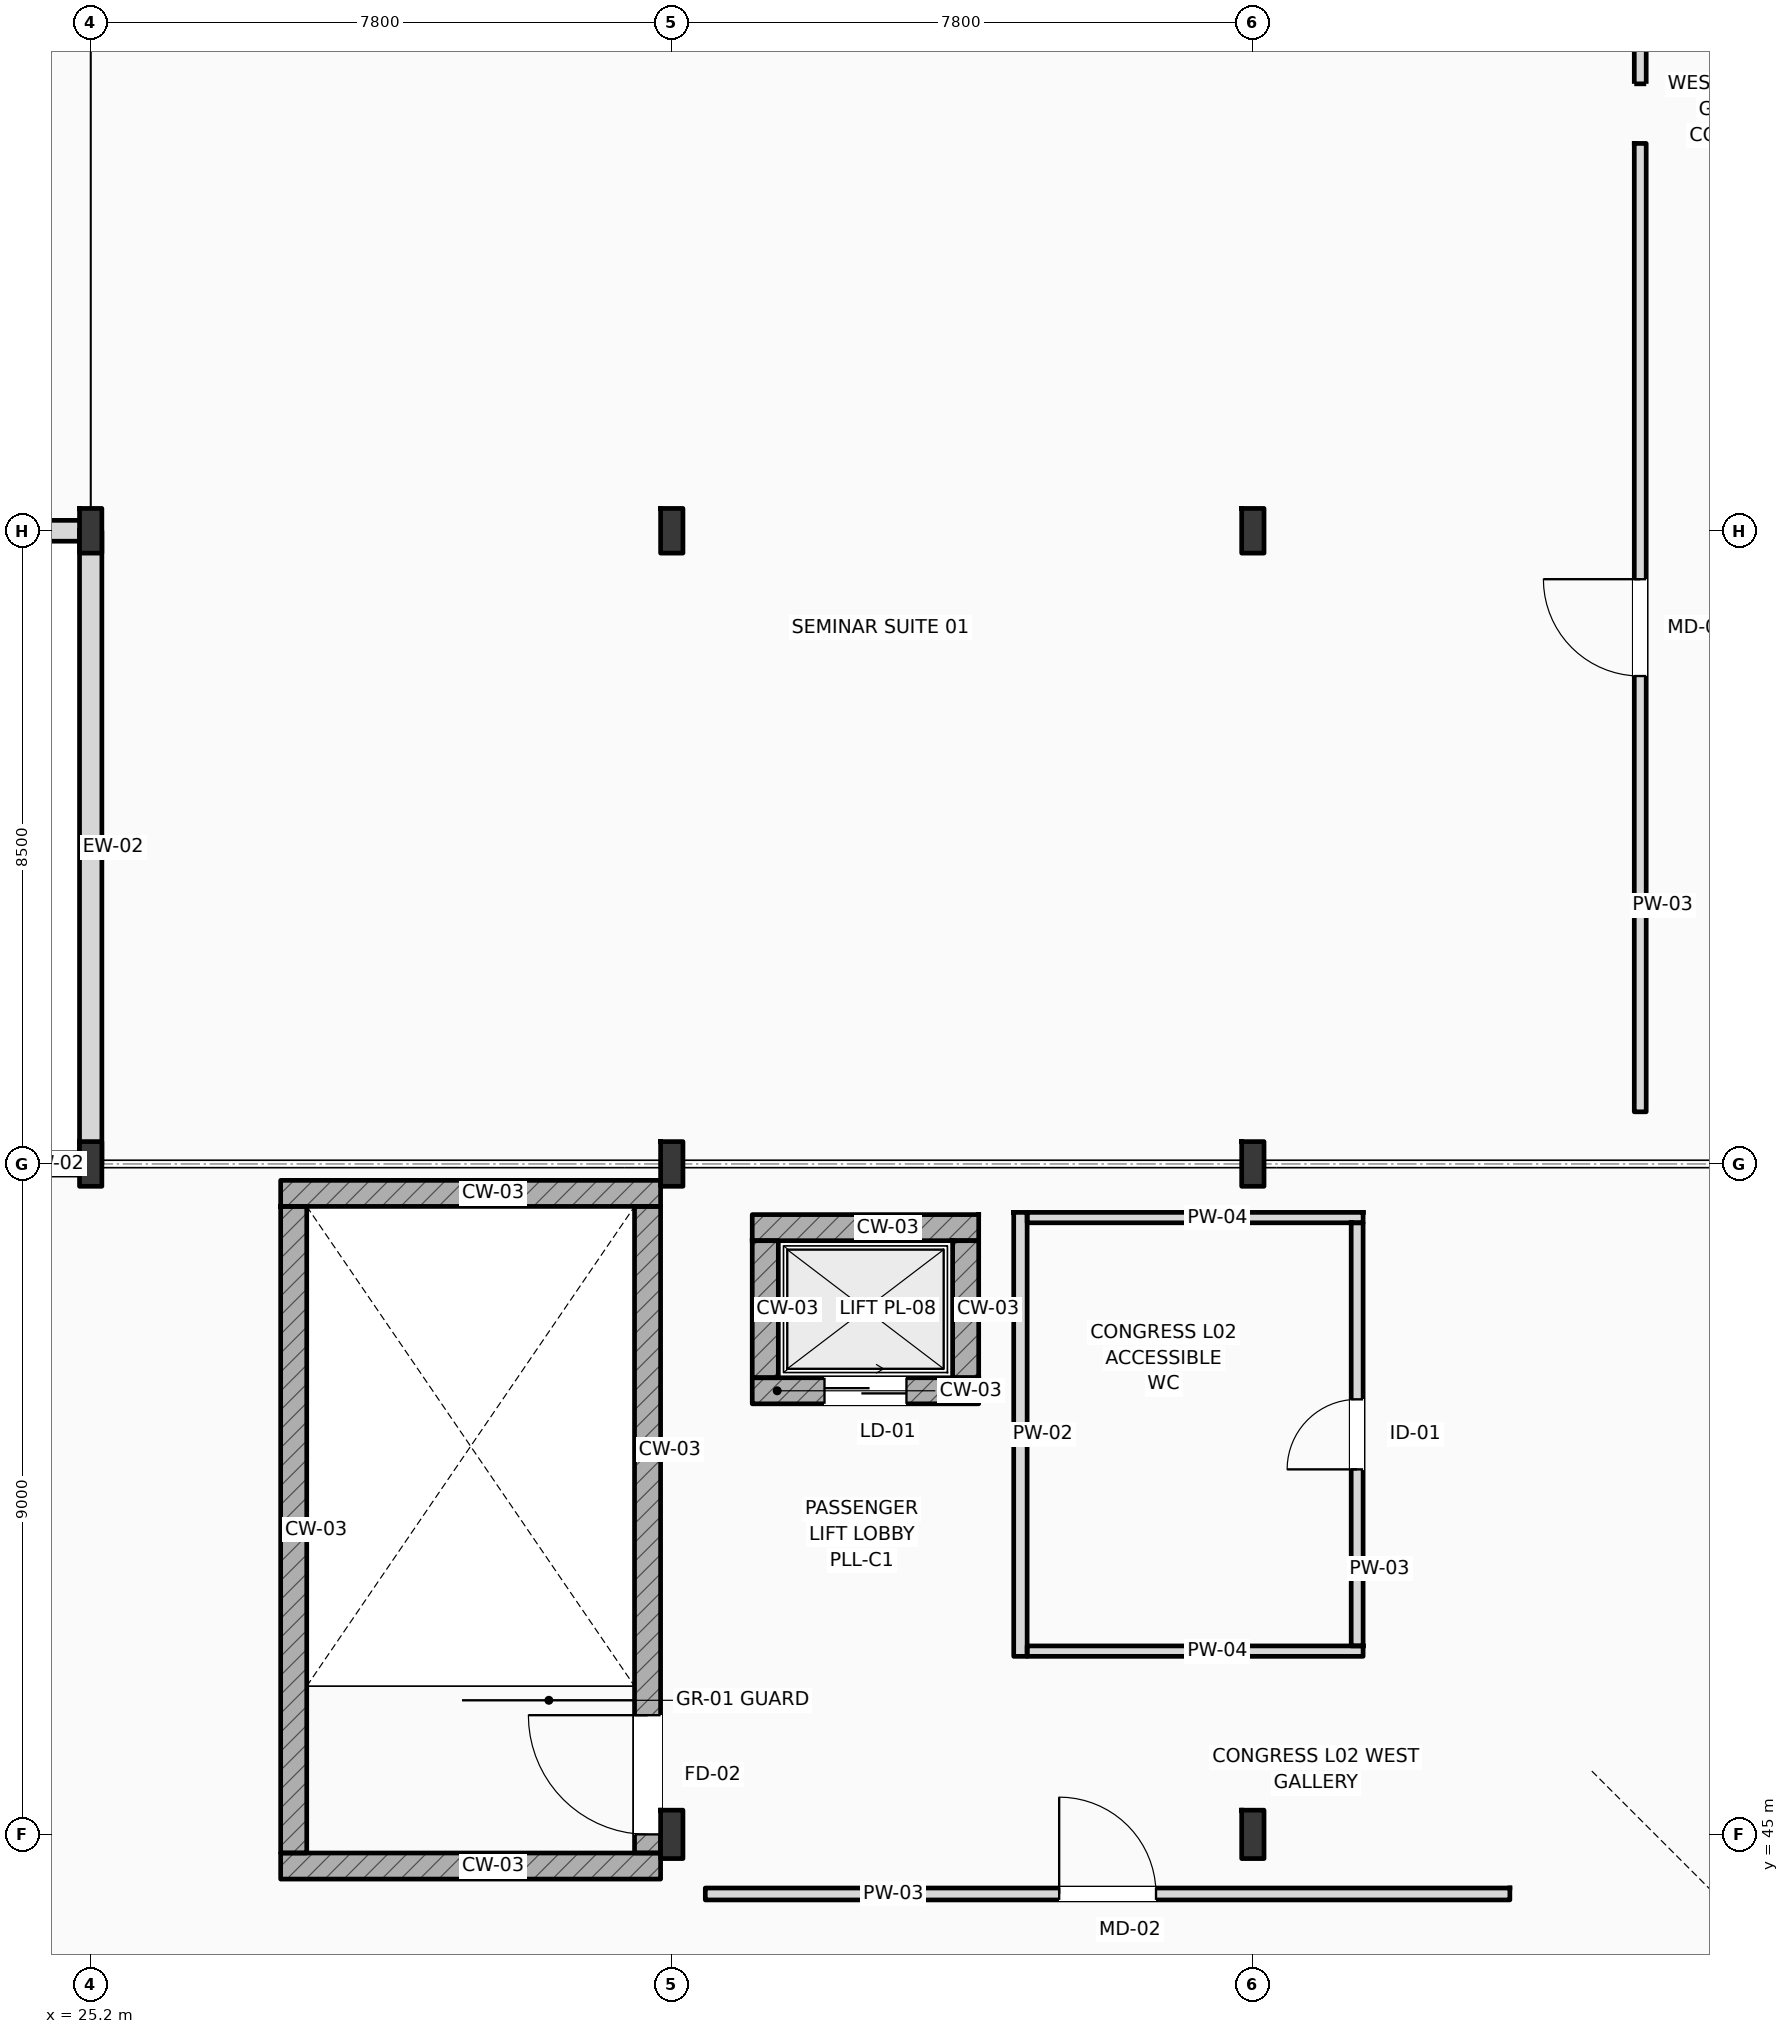
"""IFC4 building model, lengths in metres.
Left out: names, types, materials, properties, quantities, classifications, styles, units other than length and angle.
Written with IfcOpenShell. Run it as: python <this file> out.ifc"""

import sys

from ifc_helpers import new_model, si_unit, direction, frame, frame_2d, origin, origin_2d, place, context, subcontext, project, spatial, rectangle, i_section, extrude, element, fill, save


model = new_model("IFC4")
c1 = context("Model", 3, precision=1e-05, world=origin(), true_north=direction((0.0, 1.0)))
c2 = subcontext(c1, "Body", "Model", "MODEL_VIEW")
j1 = project(units=[si_unit("LENGTHUNIT", "METRE"), si_unit("PLANEANGLEUNIT", "RADIAN")], contexts=[c1])
p1 = place(None, origin())
s1 = spatial("IfcSite", under=j1, at=p1, CompositionType="ELEMENT")
p2 = place(p1, origin())
s2 = spatial("IfcBuilding", under=s1, at=p2, CompositionType="ELEMENT")
p3 = place(p2, frame((0.0, 0.0, 11.4)))
s3 = spatial("IfcBuildingStorey", under=s2, at=p3, CompositionType="ELEMENT", Elevation=11.4)
for number, where, z_axis, x_axis in (
    (1, (25.2, 62.5, 0.0), (0.0, 0.0, 1.0), (1.0, 0.0, 0.0)),
    (2, (25.2, 54.0, 0.0), (0.0, 0.0, 1.0), (1.0, 0.0, 0.0)),
    (3, (33.0, 54.0, 0.0), (0.0, 0.0, 1.0), (1.0, 0.0, 0.0)),
    (4, (33.0, 62.5, 0.0), (0.0, 0.0, 1.0), (1.0, 0.0, 0.0)),
    (5, (40.8, 54.0, 0.0), (0.0, 0.0, 1.0), (1.0, 0.0, 0.0)),
    (6, (40.8, 62.5, 0.0), (0.0, 0.0, 1.0), (1.0, 0.0, 0.0)),
):
    element("IfcColumn", number, at=place(p3, frame(where, z_axis=z_axis, x_axis=x_axis)), inside=s3, PredefinedType="COLUMN", context=c2, shape_type="SweptSolid", body=[
        extrude(i_section(OverallWidth=0.3, OverallDepth=0.6, WebThickness=0.015, FlangeThickness=0.03, FilletRadius=0.027, at=origin_2d()), origin(), (0.0, 0.0, 1.0), 4.8),
    ])
for number, where, z_axis, x_axis in (
    (7, (33.0, 45.0, 0.0), (0.0, 0.0, 1.0), (1.0, 0.0, 0.0)),
    (8, (40.8, 45.0, 0.0), (0.0, 0.0, 1.0), (1.0, 0.0, 0.0)),
):
    element("IfcColumn", number, at=place(p3, frame(where, z_axis=z_axis, x_axis=x_axis)), inside=s3, PredefinedType="COLUMN", context=c2, shape_type="SweptSolid", body=[
        extrude(i_section(OverallWidth=0.3, OverallDepth=0.65, WebThickness=0.016, FlangeThickness=0.031, FilletRadius=0.027, at=origin_2d()), origin(), (0.0, 0.0, 1.0), 4.8),
    ])
for number, where, z_axis, x_axis in (
    (9, (27.75, 53.605, 0.0), (0.0, 0.0, 1.0), (1.0, 0.0, 0.0)),
    (10, (27.75, 44.575, 0.0), (0.0, 0.0, 1.0), (1.0, 0.0, 0.0)),
):
    element("IfcWall", number, at=place(p3, frame(where, z_axis=z_axis, x_axis=x_axis)), inside=s3, PredefinedType="SHEAR", context=c2, shape_type="SweptSolid", body=[
        extrude(rectangle(XDim=5.1, YDim=0.35, at=frame_2d((2.55, 0.0))), origin(), (0.0, 0.0, 1.0), 4.8),
    ])
p4 = place(p3, frame((27.925, 44.75, 0.0), z_axis=(0.0, 0.0, 1.0), x_axis=(0.0, 1.0, 0.0)))
e11 = element("IfcWall", 11, at=p4, inside=s3, PredefinedType="SHEAR", context=c2, shape_type="SweptSolid", body=[
    extrude(rectangle(XDim=8.68, YDim=0.35, at=frame_2d((4.34, 0.0))), origin(), (0.0, 0.0, 1.0), 4.8),
])
p5 = place(p3, frame((32.675, 44.75, 0.0), z_axis=(0.0, 0.0, 1.0), x_axis=(0.0, 1.0, 0.0)))
e12 = element("IfcWall", 12, at=p5, inside=s3, PredefinedType="SHEAR", context=c2, shape_type="SweptSolid", body=[
    extrude(rectangle(XDim=8.68, YDim=0.35, at=frame_2d((4.34, 0.0))), origin(), (0.0, 0.0, 1.0), 4.8),
])
p6 = place(p5, frame((0.25, 0.0, 0.0)))
e13 = element("IfcOpeningElement", 13, at=p6, cuts=e12, PredefinedType="OPENING", context=c2, shape_type="SweptSolid", body=[
    extrude(rectangle(XDim=1.6, YDim=2.2, at=frame_2d((0.8, 1.1))), frame((0.0, 0.185, 0.0), z_axis=(0.0, -1.0, 0.0), x_axis=(1.0, 0.0, 0.0)), (0.0, 0.0, 1.0), 0.37),
])
p7 = place(p3, frame((25.2, 54.0, 0.0), z_axis=(0.0, 0.0, 1.0), x_axis=(0.0, 1.0, 0.0)))
e14 = element("IfcWall", 14, at=p7, inside=s3, PredefinedType="STANDARD", context=c2, shape_type="SweptSolid", body=[
    extrude(rectangle(XDim=8.5, YDim=0.3, at=frame_2d((4.25, 0.0))), origin(), (0.0, 0.0, 1.0), 4.11),
])
p8 = place(p3, frame((23.6, 54.0, 0.0), z_axis=(0.0, 0.0, 1.0), x_axis=(1.0, 0.0, 0.0)))
e15 = element("IfcWall", 15, at=p8, inside=s3, PredefinedType="STANDARD", context=c2, shape_type="SweptSolid", body=[
    extrude(rectangle(XDim=1.6, YDim=0.3, at=frame_2d((0.8, 0.0))), origin(), (0.0, 0.0, 1.0), 4.54),
])
p9 = place(p3, frame((0.0, 62.5, 0.0), z_axis=(0.0, 0.0, 1.0), x_axis=(1.0, 0.0, 0.0)))
e16 = element("IfcWall", 16, at=p9, inside=s3, PredefinedType="STANDARD", context=c2, shape_type="SweptSolid", body=[
    extrude(rectangle(XDim=25.2, YDim=0.28, at=frame_2d((12.6, 0.0))), origin(), (0.0, 0.0, 1.0), 3.96),
])
p10 = place(p3, frame((34.08, 53.145, 0.0), z_axis=(0.0, 0.0, 1.0), x_axis=(1.0, 0.0, 0.0)))
e17 = element("IfcWall", 17, at=p10, inside=s3, PredefinedType="SHEAR", context=c2, shape_type="SweptSolid", body=[
    extrude(rectangle(XDim=3.04, YDim=0.35, at=frame_2d((1.52, 0.0))), origin(), (0.0, 0.0, 1.0), 4.52),
])
p11 = place(p3, frame((34.08, 50.955, 0.0), z_axis=(0.0, 0.0, 1.0), x_axis=(1.0, 0.0, 0.0)))
e18 = element("IfcWall", 18, at=p11, inside=s3, PredefinedType="SHEAR", context=c2, shape_type="SweptSolid", body=[
    extrude(rectangle(XDim=3.04, YDim=0.35, at=frame_2d((1.52, 0.0))), origin(), (0.0, 0.0, 1.0), 4.52),
])
p12 = place(p11, frame((0.97, 0.0, 0.0)))
e19 = element("IfcOpeningElement", 19, at=p12, cuts=e18, PredefinedType="OPENING", context=c2, shape_type="SweptSolid", body=[
    extrude(rectangle(XDim=1.1, YDim=2.2, at=frame_2d((0.55, 1.1))), frame((0.0, 0.185, 0.0), z_axis=(0.0, -1.0, 0.0), x_axis=(1.0, 0.0, 0.0)), (0.0, 0.0, 1.0), 0.37),
])
for number, where, z_axis, x_axis in (
    (20, (34.255, 51.13, 0.0), (0.0, 0.0, 1.0), (0.0, 1.0, 0.0)),
    (21, (36.945, 51.13, 0.0), (0.0, 0.0, 1.0), (0.0, 1.0, 0.0)),
):
    element("IfcWall", number, at=place(p3, frame(where, z_axis=z_axis, x_axis=x_axis)), inside=s3, PredefinedType="SHEAR", context=c2, shape_type="SweptSolid", body=[
        extrude(rectangle(XDim=1.84, YDim=0.35, at=frame_2d((0.92, 0.0))), origin(), (0.0, 0.0, 1.0), 4.52),
    ])
p13 = place(p3, frame((33.45, 44.2, 0.0), z_axis=(0.0, 0.0, 1.0), x_axis=(1.0, 0.0, 0.0)))
e22 = element("IfcWall", 22, at=p13, inside=s3, PredefinedType="PARTITIONING", context=c2, shape_type="SweptSolid", body=[
    extrude(rectangle(XDim=10.8, YDim=0.16, at=frame_2d((5.4, 0.0))), origin(), (0.0, 0.0, 1.0), 4.52),
])
p14 = place(p13, frame((4.75, 0.0, 0.0)))
e23 = element("IfcOpeningElement", 23, at=p14, cuts=e22, PredefinedType="OPENING", context=c2, shape_type="SweptSolid", body=[
    extrude(rectangle(XDim=1.3, YDim=2.2, at=frame_2d((0.65, 1.1))), frame((0.0, 0.09, 0.0), z_axis=(0.0, -1.0, 0.0), x_axis=(1.0, 0.0, 0.0)), (0.0, 0.0, 1.0), 0.18),
])
p15 = place(p3, frame((42.2, 47.53, 0.0), z_axis=(0.0, 0.0, 1.0), x_axis=(0.0, 1.0, 0.0)))
e24 = element("IfcWall", 24, at=p15, inside=s3, PredefinedType="PARTITIONING", context=c2, shape_type="SweptSolid", body=[
    extrude(rectangle(XDim=5.68, YDim=0.16, at=frame_2d((2.84, 0.0))), origin(), (0.0, 0.0, 1.0), 4.52),
])
p16 = place(p15, frame((2.37, 0.0, 0.0)))
e25 = element("IfcOpeningElement", 25, at=p16, cuts=e24, PredefinedType="OPENING", context=c2, shape_type="SweptSolid", body=[
    extrude(rectangle(XDim=0.94, YDim=2.15, at=frame_2d((0.47, 1.075))), frame((0.0, 0.09, 0.0), z_axis=(0.0, -1.0, 0.0), x_axis=(1.0, 0.0, 0.0)), (0.0, 0.0, 1.0), 0.18),
])
p17 = place(p3, frame((46.0, 54.7, 0.0), z_axis=(0.0, 0.0, 1.0), x_axis=(0.0, 1.0, 0.0)))
e26 = element("IfcWall", 26, at=p17, inside=s3, PredefinedType="PARTITIONING", context=c2, shape_type="SweptSolid", body=[
    extrude(rectangle(XDim=13.0, YDim=0.16, at=frame_2d((6.5, 0.0))), origin(), (0.0, 0.0, 1.0), 4.18),
])
p18 = place(p17, frame((5.85, 0.0, 0.0)))
e27 = element("IfcOpeningElement", 27, at=p18, cuts=e26, PredefinedType="OPENING", context=c2, shape_type="SweptSolid", body=[
    extrude(rectangle(XDim=1.3, YDim=2.2, at=frame_2d((0.65, 1.1))), frame((0.0, 0.09, 0.0), z_axis=(0.0, -1.0, 0.0), x_axis=(1.0, 0.0, 0.0)), (0.0, 0.0, 1.0), 0.18),
])
p19 = place(p3, frame((46.0, 68.5, 0.0), z_axis=(0.0, 0.0, 1.0), x_axis=(0.0, 1.0, 0.0)))
e28 = element("IfcWall", 28, at=p19, inside=s3, PredefinedType="PARTITIONING", context=c2, shape_type="SweptSolid", body=[
    extrude(rectangle(XDim=13.2, YDim=0.16, at=frame_2d((6.6, 0.0))), origin(), (0.0, 0.0, 1.0), 4.18),
])
p20 = place(p19, frame((5.95, 0.0, 0.0)))
e29 = element("IfcOpeningElement", 29, at=p20, cuts=e28, PredefinedType="OPENING", context=c2, shape_type="SweptSolid", body=[
    extrude(rectangle(XDim=1.3, YDim=2.2, at=frame_2d((0.65, 1.1))), frame((0.0, 0.09, 0.0), z_axis=(0.0, -1.0, 0.0), x_axis=(1.0, 0.0, 0.0)), (0.0, 0.0, 1.0), 0.18),
])
p21 = place(p3, frame((37.68, 47.39, 0.0), z_axis=(0.0, 0.0, 1.0), x_axis=(0.0, 1.0, 0.0)))
e30 = element("IfcWall", 30, at=p21, inside=s3, PredefinedType="PARTITIONING", context=c2, shape_type="SweptSolid", body=[
    extrude(rectangle(XDim=5.96, YDim=0.18, at=frame_2d((2.98, 0.0))), origin(), (0.0, 0.0, 1.0), 4.52),
])
for number, where, z_axis, x_axis in (
    (31, (37.77, 47.46, 0.0), (0.0, 0.0, 1.0), (1.0, 0.0, 0.0)),
    (32, (37.77, 53.28, 0.0), (0.0, 0.0, 1.0), (1.0, 0.0, 0.0)),
):
    element("IfcWall", number, at=place(p3, frame(where, z_axis=z_axis, x_axis=x_axis)), inside=s3, PredefinedType="PARTITIONING", context=c2, shape_type="SweptSolid", body=[
        extrude(rectangle(XDim=4.51, YDim=0.14, at=frame_2d((2.255, 0.0))), origin(), (0.0, 0.0, 1.0), 4.52),
    ])
p22 = place(p6, origin())
e33 = element("IfcDoor", 33, at=p22, inside=s3, OperationType="SINGLE_SWING_RIGHT", PredefinedType="DOOR", context=c2, shape_type="SweptSolid", body=[
    extrude(rectangle(XDim=1.6, YDim=2.2, at=frame_2d((0.8, 1.1))), frame((0.0, 0.025, 0.0), z_axis=(0.0, -1.0, 0.0), x_axis=(1.0, 0.0, 0.0)), (0.0, 0.0, 1.0), 0.05),
])
fill(e13, e33)
p23 = place(p12, origin())
e34 = element("IfcDoor", 34, at=p23, inside=s3, OperationType="SLIDING_TO_LEFT", PredefinedType="DOOR", context=c2, shape_type="SweptSolid", body=[
    extrude(rectangle(XDim=1.1, YDim=2.2, at=frame_2d((0.55, 1.1))), frame((0.0, 0.025, 0.0), z_axis=(0.0, -1.0, 0.0), x_axis=(1.0, 0.0, 0.0)), (0.0, 0.0, 1.0), 0.05),
])
fill(e19, e34)
p24 = place(p14, origin())
e35 = element("IfcDoor", 35, at=p24, inside=s3, OperationType="SINGLE_SWING_LEFT", PredefinedType="DOOR", context=c2, shape_type="SweptSolid", body=[
    extrude(rectangle(XDim=1.3, YDim=2.2, at=frame_2d((0.65, 1.1))), frame((0.0, 0.025, 0.0), z_axis=(0.0, -1.0, 0.0), x_axis=(1.0, 0.0, 0.0)), (0.0, 0.0, 1.0), 0.05),
])
fill(e23, e35)
p25 = place(p16, origin())
e36 = element("IfcDoor", 36, at=p25, inside=s3, OperationType="SINGLE_SWING_LEFT", PredefinedType="DOOR", context=c2, shape_type="SweptSolid", body=[
    extrude(rectangle(XDim=0.94, YDim=2.15, at=frame_2d((0.47, 1.075))), frame((0.0, 0.025, 0.0), z_axis=(0.0, -1.0, 0.0), x_axis=(1.0, 0.0, 0.0)), (0.0, 0.0, 1.0), 0.05),
])
fill(e25, e36)
p26 = place(p18, origin())
e37 = element("IfcDoor", 37, at=p26, inside=s3, OperationType="SINGLE_SWING_RIGHT", PredefinedType="DOOR", context=c2, shape_type="SweptSolid", body=[
    extrude(rectangle(XDim=1.3, YDim=2.2, at=frame_2d((0.65, 1.1))), frame((0.0, 0.025, 0.0), z_axis=(0.0, -1.0, 0.0), x_axis=(1.0, 0.0, 0.0)), (0.0, 0.0, 1.0), 0.05),
])
fill(e27, e37)
save(model, sys.argv[1])
